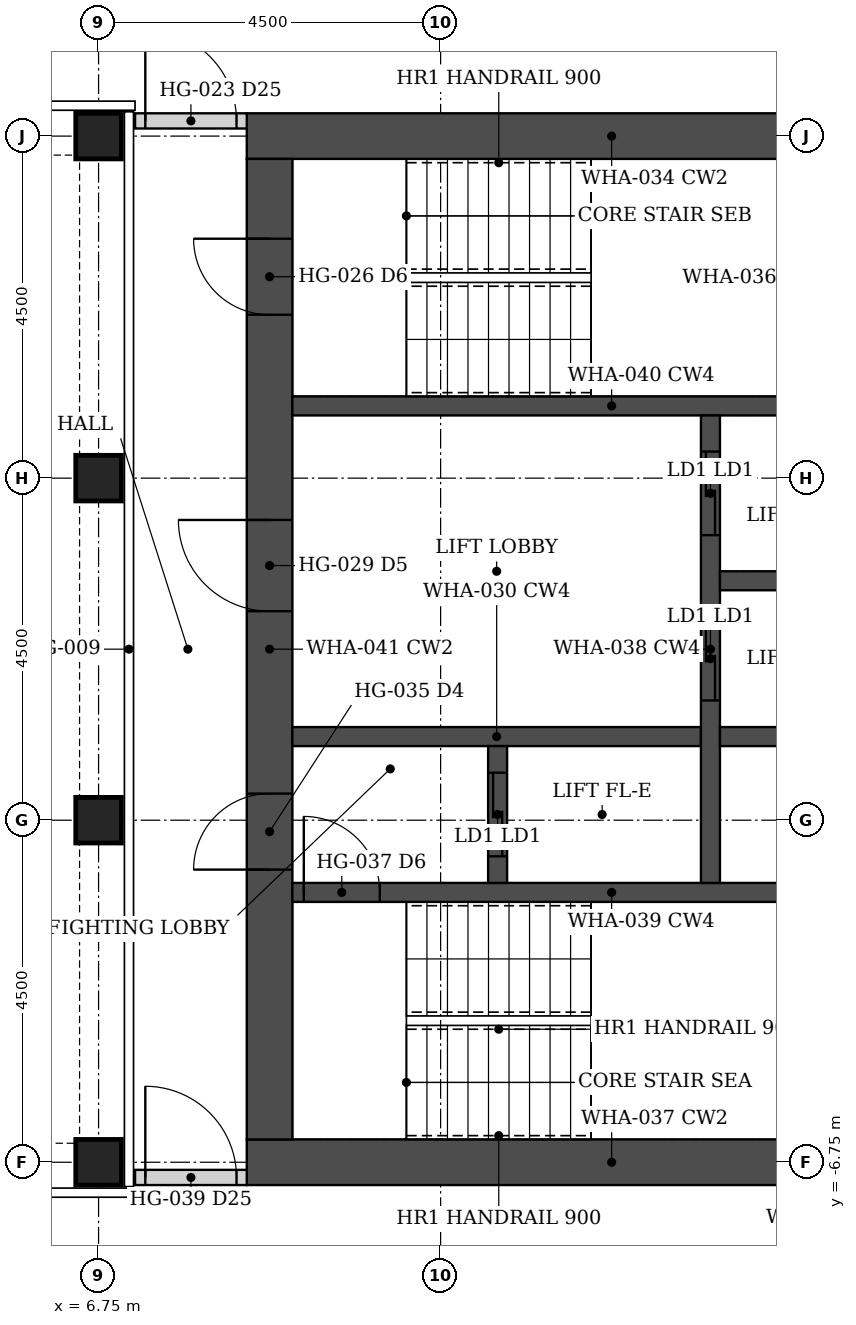
"""IFC4 building model, lengths in metres.
Left out: names, types, materials, properties, quantities, classifications, styles, units other than length and angle.
Written with IfcOpenShell. Run it as: python <this file> out.ifc"""

import sys

from ifc_helpers import new_model, si_unit, direction, frame, frame_2d, origin, origin_2d, place, context, subcontext, project, spatial, rectangle, hollow_rectangle, extrude, element, fill, save


model = new_model("IFC4")
c1 = context("Model", 3, precision=1e-05, world=origin(), true_north=direction((0.0, 1.0)))
c2 = subcontext(c1, "Body", "Model", "MODEL_VIEW")
j1 = project(units=[si_unit("LENGTHUNIT", "METRE"), si_unit("PLANEANGLEUNIT", "RADIAN")], contexts=[c1])
p1 = place(None, origin())
s1 = spatial("IfcSite", under=j1, at=p1, CompositionType="ELEMENT")
p2 = place(p1, origin())
s2 = spatial("IfcBuilding", under=s1, at=p2, CompositionType="ELEMENT")
p3 = place(p2, frame((0.0, 0.0, 186.8)))
s3 = spatial("IfcBuildingStorey", under=s2, at=p3, CompositionType="ELEMENT", Elevation=186.8)
for number, where, z_axis, x_axis in (
    (1, (6.75, -6.75, 0.0), (0.0, 0.0, 1.0), (1.0, 0.0, 0.0)),
    (2, (6.75, -2.25, 0.0), (0.0, 0.0, 1.0), (1.0, 0.0, 0.0)),
    (3, (6.75, 2.25, 0.0), (0.0, 0.0, 1.0), (1.0, 0.0, 0.0)),
    (4, (6.75, 6.75, 0.0), (0.0, 0.0, 1.0), (1.0, 0.0, 0.0)),
):
    element("IfcColumn", number, at=place(p3, frame(where, z_axis=z_axis, x_axis=x_axis)), inside=s3, PredefinedType="COLUMN", context=c2, shape_type="SweptSolid", body=[
        extrude(hollow_rectangle(XDim=0.6, YDim=0.6, WallThickness=0.03, at=origin_2d()), origin(), (0.0, 0.0, 1.0), 3.6),
    ])
for number, where, z_axis, x_axis in (
    (5, (8.7, -6.75, 0.0), (0.0, 0.0, 1.0), (1.0, 0.0, 0.0)),
    (6, (8.7, 6.75, 0.0), (0.0, 0.0, 1.0), (1.0, 0.0, 0.0)),
):
    element("IfcWall", number, at=place(p3, frame(where, z_axis=z_axis, x_axis=x_axis)), inside=s3, PredefinedType="SHEAR", context=c2, shape_type="SweptSolid", body=[
        extrude(rectangle(XDim=9.6, YDim=0.6, at=frame_2d((4.8, 0.0))), origin(), (0.0, 0.0, 1.0), 3.6),
    ])
p4 = place(p3, frame((9.0, -6.45, 0.0), z_axis=(0.0, 0.0, 1.0), x_axis=(0.0, 1.0, 0.0)))
e7 = element("IfcWall", 7, at=p4, inside=s3, PredefinedType="SHEAR", context=c2, shape_type="SweptSolid", body=[
    extrude(rectangle(XDim=12.9, YDim=0.6, at=frame_2d((6.45, 0.0))), origin(), (0.0, 0.0, 1.0), 3.6),
])
p5 = place(p4, frame((3.55, 0.0, 0.0)))
e8 = element("IfcOpeningElement", 8, at=p5, cuts=e7, PredefinedType="OPENING", context=c2, shape_type="SweptSolid", body=[
    extrude(rectangle(XDim=1.0, YDim=2.1, at=frame_2d((0.5, 1.05))), frame((0.0, 0.31, 0.0), z_axis=(0.0, -1.0, 0.0), x_axis=(1.0, 0.0, 0.0)), (0.0, 0.0, 1.0), 0.62),
])
p6 = place(p4, frame((6.95, 0.0, 0.0)))
e9 = element("IfcOpeningElement", 9, at=p6, cuts=e7, PredefinedType="OPENING", context=c2, shape_type="SweptSolid", body=[
    extrude(rectangle(XDim=1.2, YDim=2.1, at=frame_2d((0.6, 1.05))), frame((0.0, 0.31, 0.0), z_axis=(0.0, -1.0, 0.0), x_axis=(1.0, 0.0, 0.0)), (0.0, 0.0, 1.0), 0.62),
])
p7 = place(p4, frame((10.85, 0.0, 0.0)))
e10 = element("IfcOpeningElement", 10, at=p7, cuts=e7, PredefinedType="OPENING", context=c2, shape_type="SweptSolid", body=[
    extrude(rectangle(XDim=1.0, YDim=2.1, at=frame_2d((0.5, 1.05))), frame((0.0, 0.31, 0.0), z_axis=(0.0, -1.0, 0.0), x_axis=(1.0, 0.0, 0.0)), (0.0, 0.0, 1.0), 0.62),
])
p8 = place(p3, frame((9.3, -3.2, 0.0), z_axis=(0.0, 0.0, 1.0), x_axis=(1.0, 0.0, 0.0)))
e11 = element("IfcWall", 11, at=p8, inside=s3, PredefinedType="SHEAR", context=c2, shape_type="SweptSolid", body=[
    extrude(rectangle(XDim=8.4, YDim=0.25, at=frame_2d((4.2, 0.0))), origin(), (0.0, 0.0, 1.0), 3.6),
])
p9 = place(p8, frame((0.15, 0.0, 0.0)))
e12 = element("IfcOpeningElement", 12, at=p9, cuts=e11, PredefinedType="OPENING", context=c2, shape_type="SweptSolid", body=[
    extrude(rectangle(XDim=1.0, YDim=2.1, at=frame_2d((0.5, 1.05))), frame((0.0, 0.135, 0.0), z_axis=(0.0, -1.0, 0.0), x_axis=(1.0, 0.0, 0.0)), (0.0, 0.0, 1.0), 0.27),
])
p10 = place(p3, frame((9.3, 3.2, 0.0), z_axis=(0.0, 0.0, 1.0), x_axis=(1.0, 0.0, 0.0)))
e13 = element("IfcWall", 13, at=p10, inside=s3, PredefinedType="SHEAR", context=c2, shape_type="SweptSolid", body=[
    extrude(rectangle(XDim=8.4, YDim=0.25, at=frame_2d((4.2, 0.0))), origin(), (0.0, 0.0, 1.0), 3.6),
])
p11 = place(p3, frame((9.3, -1.15, 0.0), z_axis=(0.0, 0.0, 1.0), x_axis=(1.0, 0.0, 0.0)))
e14 = element("IfcWall", 14, at=p11, inside=s3, PredefinedType="SHEAR", context=c2, shape_type="SweptSolid", body=[
    extrude(rectangle(XDim=5.375, YDim=0.25, at=frame_2d((2.688, 0.0))), origin(), (0.0, 0.0, 1.0), 3.6),
])
p12 = place(p3, frame((12.0, -3.075, 0.0), z_axis=(0.0, 0.0, 1.0), x_axis=(0.0, 1.0, 0.0)))
e15 = element("IfcWall", 15, at=p12, inside=s3, PredefinedType="SHEAR", context=c2, shape_type="SweptSolid", body=[
    extrude(rectangle(XDim=1.8, YDim=0.25, at=frame_2d((0.9, 0.0))), origin(), (0.0, 0.0, 1.0), 3.6),
])
p13 = place(p12, frame((0.35, 0.0, 0.0)))
e16 = element("IfcOpeningElement", 16, at=p13, cuts=e15, PredefinedType="OPENING", context=c2, shape_type="SweptSolid", body=[
    extrude(rectangle(XDim=1.1, YDim=2.1, at=frame_2d((0.55, 1.05))), frame((0.0, 0.135, 0.0), z_axis=(0.0, -1.0, 0.0), x_axis=(1.0, 0.0, 0.0)), (0.0, 0.0, 1.0), 0.27),
])
p14 = place(p3, frame((14.8, -3.075, 0.0), z_axis=(0.0, 0.0, 1.0), x_axis=(0.0, 1.0, 0.0)))
e17 = element("IfcWall", 17, at=p14, inside=s3, PredefinedType="SHEAR", context=c2, shape_type="SweptSolid", body=[
    extrude(rectangle(XDim=6.15, YDim=0.25, at=frame_2d((3.075, 0.0))), origin(), (0.0, 0.0, 1.0), 3.6),
])
p15 = place(p14, frame((2.4, 0.0, 0.0)))
e18 = element("IfcOpeningElement", 18, at=p15, cuts=e17, PredefinedType="OPENING", context=c2, shape_type="SweptSolid", body=[
    extrude(rectangle(XDim=1.1, YDim=2.1, at=frame_2d((0.55, 1.05))), frame((0.0, 0.135, 0.0), z_axis=(0.0, -1.0, 0.0), x_axis=(1.0, 0.0, 0.0)), (0.0, 0.0, 1.0), 0.27),
])
p16 = place(p14, frame((4.575, 0.0, 0.0)))
e19 = element("IfcOpeningElement", 19, at=p16, cuts=e17, PredefinedType="OPENING", context=c2, shape_type="SweptSolid", body=[
    extrude(rectangle(XDim=1.1, YDim=2.1, at=frame_2d((0.55, 1.05))), frame((0.0, 0.135, 0.0), z_axis=(0.0, -1.0, 0.0), x_axis=(1.0, 0.0, 0.0)), (0.0, 0.0, 1.0), 0.27),
])
for number, where, z_axis, x_axis in (
    (20, (14.925, -1.15, 0.0), (0.0, 0.0, 1.0), (1.0, 0.0, 0.0)),
    (21, (14.925, 0.9, 0.0), (0.0, 0.0, 1.0), (1.0, 0.0, 0.0)),
):
    element("IfcWall", number, at=place(p3, frame(where, z_axis=z_axis, x_axis=x_axis)), inside=s3, PredefinedType="SHEAR", context=c2, shape_type="SweptSolid", body=[
        extrude(rectangle(XDim=2.775, YDim=0.25, at=frame_2d((1.387, 0.0))), origin(), (0.0, 0.0, 1.0), 3.6),
    ])
p17 = place(p3, frame((7.23, 6.95, 0.0), z_axis=(0.0, 0.0, 1.0), x_axis=(1.0, 0.0, 0.0)))
e22 = element("IfcWall", 22, at=p17, inside=s3, PredefinedType="PARTITIONING", context=c2, shape_type="SweptSolid", body=[
    extrude(rectangle(XDim=1.47, YDim=0.2, at=frame_2d((0.735, 0.0))), origin(), (0.0, 0.0, 1.0), 2.379),
])
p18 = place(p17, frame((0.135, 0.0, 0.0)))
e23 = element("IfcOpeningElement", 23, at=p18, cuts=e22, PredefinedType="OPENING", context=c2, shape_type="SweptSolid", body=[
    extrude(rectangle(XDim=1.2, YDim=2.1, at=frame_2d((0.6, 1.05))), frame((0.0, 0.11, 0.0), z_axis=(0.0, -1.0, 0.0), x_axis=(1.0, 0.0, 0.0)), (0.0, 0.0, 1.0), 0.22),
])
p19 = place(p3, frame((7.23, -6.95, 0.0), z_axis=(0.0, 0.0, 1.0), x_axis=(1.0, 0.0, 0.0)))
e24 = element("IfcWall", 24, at=p19, inside=s3, PredefinedType="PARTITIONING", context=c2, shape_type="SweptSolid", body=[
    extrude(rectangle(XDim=1.47, YDim=0.2, at=frame_2d((0.735, 0.0))), origin(), (0.0, 0.0, 1.0), 2.379),
])
p20 = place(p19, frame((0.135, 0.0, 0.0)))
e25 = element("IfcOpeningElement", 25, at=p20, cuts=e24, PredefinedType="OPENING", context=c2, shape_type="SweptSolid", body=[
    extrude(rectangle(XDim=1.2, YDim=2.1, at=frame_2d((0.6, 1.05))), frame((0.0, 0.11, 0.0), z_axis=(0.0, -1.0, 0.0), x_axis=(1.0, 0.0, 0.0)), (0.0, 0.0, 1.0), 0.22),
])
p21 = place(p18, origin())
e26 = element("IfcDoor", 26, at=p21, inside=s3, OperationType="DOUBLE_DOOR_DOUBLE_SWING", PredefinedType="DOOR", context=c2, shape_type="SweptSolid", body=[
    extrude(rectangle(XDim=1.2, YDim=2.1, at=frame_2d((0.6, 1.05))), frame((0.0, 0.025, 0.0), z_axis=(0.0, -1.0, 0.0), x_axis=(1.0, 0.0, 0.0)), (0.0, 0.0, 1.0), 0.05),
])
fill(e23, e26)
p22 = place(p20, origin())
e27 = element("IfcDoor", 27, at=p22, inside=s3, OperationType="DOUBLE_DOOR_DOUBLE_SWING", PredefinedType="DOOR", context=c2, shape_type="SweptSolid", body=[
    extrude(rectangle(XDim=1.2, YDim=2.1, at=frame_2d((0.6, 1.05))), frame((0.0, 0.025, 0.0), z_axis=(0.0, -1.0, 0.0), x_axis=(1.0, 0.0, 0.0)), (0.0, 0.0, 1.0), 0.05),
])
fill(e25, e27)
p23 = place(p5, origin())
e28 = element("IfcDoor", 28, at=p23, inside=s3, OperationType="SINGLE_SWING_LEFT", PredefinedType="DOOR", context=c2, shape_type="SweptSolid", body=[
    extrude(rectangle(XDim=1.0, YDim=2.1, at=frame_2d((0.5, 1.05))), frame((0.0, 0.025, 0.0), z_axis=(0.0, -1.0, 0.0), x_axis=(1.0, 0.0, 0.0)), (0.0, 0.0, 1.0), 0.05),
])
fill(e8, e28)
p24 = place(p9, origin())
e29 = element("IfcDoor", 29, at=p24, inside=s3, OperationType="SINGLE_SWING_LEFT", PredefinedType="DOOR", context=c2, shape_type="SweptSolid", body=[
    extrude(rectangle(XDim=1.0, YDim=2.1, at=frame_2d((0.5, 1.05))), frame((0.0, 0.025, 0.0), z_axis=(0.0, -1.0, 0.0), x_axis=(1.0, 0.0, 0.0)), (0.0, 0.0, 1.0), 0.05),
])
fill(e12, e29)
p25 = place(p6, origin())
e30 = element("IfcDoor", 30, at=p25, inside=s3, OperationType="SINGLE_SWING_RIGHT", PredefinedType="DOOR", context=c2, shape_type="SweptSolid", body=[
    extrude(rectangle(XDim=1.2, YDim=2.1, at=frame_2d((0.6, 1.05))), frame((0.0, 0.025, 0.0), z_axis=(0.0, -1.0, 0.0), x_axis=(1.0, 0.0, 0.0)), (0.0, 0.0, 1.0), 0.05),
])
fill(e9, e30)
p26 = place(p7, origin())
e31 = element("IfcDoor", 31, at=p26, inside=s3, OperationType="SINGLE_SWING_RIGHT", PredefinedType="DOOR", context=c2, shape_type="SweptSolid", body=[
    extrude(rectangle(XDim=1.0, YDim=2.1, at=frame_2d((0.5, 1.05))), frame((0.0, 0.025, 0.0), z_axis=(0.0, -1.0, 0.0), x_axis=(1.0, 0.0, 0.0)), (0.0, 0.0, 1.0), 0.05),
])
fill(e10, e31)
p27 = place(p13, origin())
e32 = element("IfcDoor", 32, at=p27, inside=s3, OperationType="DOUBLE_DOOR_SLIDING", PredefinedType="DOOR", context=c2, shape_type="SweptSolid", body=[
    extrude(rectangle(XDim=1.1, YDim=2.1, at=frame_2d((0.55, 1.05))), frame((0.0, 0.025, 0.0), z_axis=(0.0, -1.0, 0.0), x_axis=(1.0, 0.0, 0.0)), (0.0, 0.0, 1.0), 0.05),
])
fill(e16, e32)
p28 = place(p15, origin())
e33 = element("IfcDoor", 33, at=p28, inside=s3, OperationType="DOUBLE_DOOR_SLIDING", PredefinedType="DOOR", context=c2, shape_type="SweptSolid", body=[
    extrude(rectangle(XDim=1.1, YDim=2.1, at=frame_2d((0.55, 1.05))), frame((0.0, 0.025, 0.0), z_axis=(0.0, -1.0, 0.0), x_axis=(1.0, 0.0, 0.0)), (0.0, 0.0, 1.0), 0.05),
])
fill(e18, e33)
p29 = place(p16, origin())
e34 = element("IfcDoor", 34, at=p29, inside=s3, OperationType="DOUBLE_DOOR_SLIDING", PredefinedType="DOOR", context=c2, shape_type="SweptSolid", body=[
    extrude(rectangle(XDim=1.1, YDim=2.1, at=frame_2d((0.55, 1.05))), frame((0.0, 0.025, 0.0), z_axis=(0.0, -1.0, 0.0), x_axis=(1.0, 0.0, 0.0)), (0.0, 0.0, 1.0), 0.05),
])
fill(e19, e34)
save(model, sys.argv[1])
